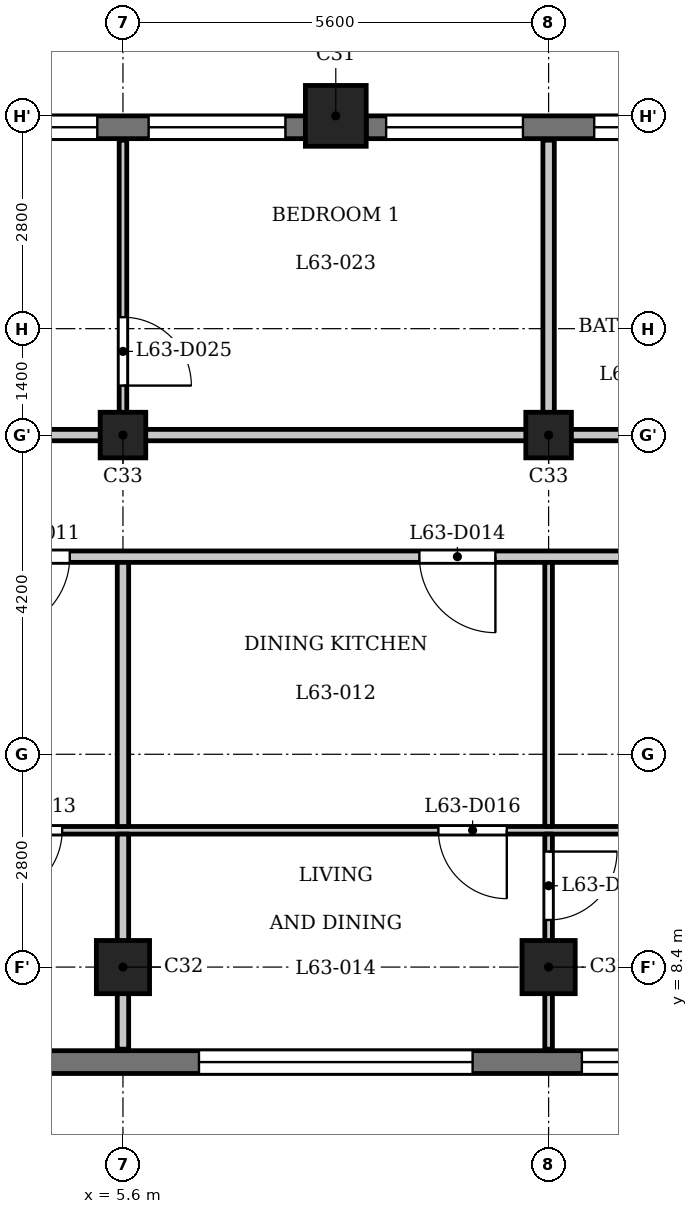
"""IFC4 building model, lengths in metres.
Left out: names, types, materials, properties, quantities, classifications, styles, units other than length and angle.
Written with IfcOpenShell. Run it as: python <this file> out.ifc"""

import sys

from ifc_helpers import new_model, si_unit, direction, frame, frame_2d, origin, origin_2d, place, context, subcontext, project, spatial, rectangle, extrude, element, fill, save


model = new_model("IFC4")
c1 = context("Model", 3, precision=1e-05, world=origin(), true_north=direction((0.0, 1.0)))
c2 = subcontext(c1, "Body", "Model", "MODEL_VIEW")
j1 = project(units=[si_unit("LENGTHUNIT", "METRE"), si_unit("PLANEANGLEUNIT", "RADIAN")], contexts=[c1])
p1 = place(None, origin())
s1 = spatial("IfcSite", under=j1, at=p1, CompositionType="ELEMENT")
p2 = place(p1, origin())
s2 = spatial("IfcBuilding", under=s1, at=p2, CompositionType="ELEMENT")
p3 = place(p2, frame((0.0, 0.0, 245.2)))
s3 = spatial("IfcBuildingStorey", under=s2, at=p3, CompositionType="ELEMENT", Elevation=245.2)
p4 = place(p3, frame((8.4, 19.6, 0.0), z_axis=(0.0, 0.0, 1.0), x_axis=(1.0, 0.0, 0.0)))
e1 = element("IfcColumn", 1, at=p4, inside=s3, PredefinedType="COLUMN", context=c2, shape_type="SweptSolid", body=[
    extrude(rectangle(XDim=0.8, YDim=0.8, at=origin_2d()), origin(), (0.0, 0.0, 1.0), 3.5),
])
for number, where, z_axis, x_axis in (
    (2, (5.6, 8.4, 0.0), (0.0, 0.0, 1.0), (1.0, 0.0, 0.0)),
    (3, (11.2, 8.4, 0.0), (0.0, 0.0, 1.0), (1.0, 0.0, 0.0)),
):
    element("IfcColumn", number, at=place(p3, frame(where, z_axis=z_axis, x_axis=x_axis)), inside=s3, PredefinedType="COLUMN", context=c2, shape_type="SweptSolid", body=[
        extrude(rectangle(XDim=0.7, YDim=0.7, at=origin_2d()), origin(), (0.0, 0.0, 1.0), 3.5),
    ])
for number, where, z_axis, x_axis in (
    (4, (5.6, 15.4, 0.0), (0.0, 0.0, 1.0), (1.0, 0.0, 0.0)),
    (5, (11.2, 15.4, 0.0), (0.0, 0.0, 1.0), (1.0, 0.0, 0.0)),
):
    element("IfcColumn", number, at=place(p3, frame(where, z_axis=z_axis, x_axis=x_axis)), inside=s3, PredefinedType="COLUMN", context=c2, shape_type="SweptSolid", body=[
        extrude(rectangle(XDim=0.6, YDim=0.6, at=origin_2d()), origin(), (0.0, 0.0, 1.0), 3.5),
    ])
p5 = place(p3, frame((13.6, 19.45, 0.0), z_axis=(0.0, 0.0, 1.0), x_axis=(-1.0, 0.0, 0.0)))
e6 = element("IfcWall", 6, at=p5, inside=s3, PredefinedType="SOLIDWALL", context=c2, shape_type="SweptSolid", body=[
    extrude(rectangle(XDim=4.8, YDim=0.3, at=frame_2d((2.4, 0.0))), origin(), (0.0, 0.0, 1.0), 2.55),
])
p6 = place(p5, frame((0.6, 0.0, 0.6)))
e7 = element("IfcOpeningElement", 7, at=p6, cuts=e6, PredefinedType="OPENING", context=c2, shape_type="SweptSolid", body=[
    extrude(rectangle(XDim=1.2, YDim=1.55, at=frame_2d((0.6, 0.775))), frame((0.0, 0.16, 0.0), z_axis=(0.0, -1.0, 0.0), x_axis=(1.0, 0.0, 0.0)), (0.0, 0.0, 1.0), 0.32),
])
p7 = place(p5, frame((2.738, 0.0, 0.9)))
e8 = element("IfcOpeningElement", 8, at=p7, cuts=e6, PredefinedType="OPENING", context=c2, shape_type="SweptSolid", body=[
    extrude(rectangle(XDim=1.8, YDim=1.25, at=frame_2d((0.9, 0.625))), frame((0.0, 0.16, 0.0), z_axis=(0.0, -1.0, 0.0), x_axis=(1.0, 0.0, 0.0)), (0.0, 0.0, 1.0), 0.32),
])
p8 = place(p3, frame((8.0, 19.45, 0.0), z_axis=(0.0, 0.0, 1.0), x_axis=(-1.0, 0.0, 0.0)))
e9 = element("IfcWall", 9, at=p8, inside=s3, PredefinedType="SOLIDWALL", context=c2, shape_type="SweptSolid", body=[
    extrude(rectangle(XDim=4.8, YDim=0.3, at=frame_2d((2.4, 0.0))), origin(), (0.0, 0.0, 1.0), 2.55),
])
p9 = place(p8, frame((0.262, 0.0, 0.9)))
e10 = element("IfcOpeningElement", 10, at=p9, cuts=e9, PredefinedType="OPENING", context=c2, shape_type="SweptSolid", body=[
    extrude(rectangle(XDim=1.8, YDim=1.25, at=frame_2d((0.9, 0.625))), frame((0.0, 0.16, 0.0), z_axis=(0.0, -1.0, 0.0), x_axis=(1.0, 0.0, 0.0)), (0.0, 0.0, 1.0), 0.32),
])
p10 = place(p8, frame((2.738, 0.0, 0.9)))
e11 = element("IfcOpeningElement", 11, at=p10, cuts=e9, PredefinedType="OPENING", context=c2, shape_type="SweptSolid", body=[
    extrude(rectangle(XDim=1.8, YDim=1.25, at=frame_2d((0.9, 0.625))), frame((0.0, 0.16, 0.0), z_axis=(0.0, -1.0, 0.0), x_axis=(1.0, 0.0, 0.0)), (0.0, 0.0, 1.0), 0.32),
])
p11 = place(p3, frame((-13.8, 7.15, 0.0), z_axis=(0.0, 0.0, 1.0), x_axis=(1.0, 0.0, 0.0)))
e12 = element("IfcWall", 12, at=p11, inside=s3, PredefinedType="SOLIDWALL", context=c2, shape_type="SweptSolid", body=[
    extrude(rectangle(XDim=27.6, YDim=0.3, at=frame_2d((13.8, 0.0))), origin(), (0.0, 0.0, 1.0), 3.2),
])
p12 = place(p11, frame((0.363, 0.0, 0.9)))
e13 = element("IfcOpeningElement", 13, at=p12, cuts=e12, PredefinedType="OPENING", context=c2, shape_type="SweptSolid", body=[
    extrude(rectangle(XDim=1.8, YDim=1.25, at=frame_2d((0.9, 0.625))), frame((0.0, 0.16, 0.0), z_axis=(0.0, -1.0, 0.0), x_axis=(1.0, 0.0, 0.0)), (0.0, 0.0, 1.0), 0.32),
])
p13 = place(p11, frame((3.6, 0.0, 1.2)))
e14 = element("IfcOpeningElement", 14, at=p13, cuts=e12, PredefinedType="OPENING", context=c2, shape_type="SweptSolid", body=[
    extrude(rectangle(XDim=3.6, YDim=0.95, at=frame_2d((1.8, 0.475))), frame((0.0, 0.16, 0.0), z_axis=(0.0, -1.0, 0.0), x_axis=(1.0, 0.0, 0.0)), (0.0, 0.0, 1.0), 0.32),
])
p14 = place(p11, frame((9.2, 0.0, 1.2)))
e15 = element("IfcOpeningElement", 15, at=p14, cuts=e12, PredefinedType="OPENING", context=c2, shape_type="SweptSolid", body=[
    extrude(rectangle(XDim=3.6, YDim=0.95, at=frame_2d((1.8, 0.475))), frame((0.0, 0.16, 0.0), z_axis=(0.0, -1.0, 0.0), x_axis=(1.0, 0.0, 0.0)), (0.0, 0.0, 1.0), 0.32),
])
p15 = place(p11, frame((14.8, 0.0, 1.2)))
e16 = element("IfcOpeningElement", 16, at=p15, cuts=e12, PredefinedType="OPENING", context=c2, shape_type="SweptSolid", body=[
    extrude(rectangle(XDim=3.6, YDim=0.95, at=frame_2d((1.8, 0.475))), frame((0.0, 0.16, 0.0), z_axis=(0.0, -1.0, 0.0), x_axis=(1.0, 0.0, 0.0)), (0.0, 0.0, 1.0), 0.32),
])
p16 = place(p11, frame((20.4, 0.0, 1.2)))
e17 = element("IfcOpeningElement", 17, at=p16, cuts=e12, PredefinedType="OPENING", context=c2, shape_type="SweptSolid", body=[
    extrude(rectangle(XDim=3.6, YDim=0.95, at=frame_2d((1.8, 0.475))), frame((0.0, 0.16, 0.0), z_axis=(0.0, -1.0, 0.0), x_axis=(1.0, 0.0, 0.0)), (0.0, 0.0, 1.0), 0.32),
])
p17 = place(p11, frame((25.438, 0.0, 0.9)))
e18 = element("IfcOpeningElement", 18, at=p17, cuts=e12, PredefinedType="OPENING", context=c2, shape_type="SweptSolid", body=[
    extrude(rectangle(XDim=1.8, YDim=1.25, at=frame_2d((0.9, 0.625))), frame((0.0, 0.16, 0.0), z_axis=(0.0, -1.0, 0.0), x_axis=(1.0, 0.0, 0.0)), (0.0, 0.0, 1.0), 0.32),
])
p18 = place(p3, frame((-14.925, 10.2, 0.0), z_axis=(0.0, 0.0, 1.0), x_axis=(1.0, 0.0, 0.0)))
e19 = element("IfcWall", 19, at=p18, inside=s3, PredefinedType="PARTITIONING", context=c2, shape_type="SweptSolid", body=[
    extrude(rectangle(XDim=29.85, YDim=0.1, at=frame_2d((14.925, 0.0))), origin(), (0.0, 0.0, 1.0), 3.2),
])
p19 = place(p18, frame((13.475, 0.0, 0.0)))
e20 = element("IfcOpeningElement", 20, at=p19, cuts=e19, PredefinedType="OPENING", context=c2, shape_type="SweptSolid", body=[
    extrude(rectangle(XDim=0.9, YDim=2.1, at=frame_2d((0.45, 1.05))), frame((0.0, 0.06, 0.0), z_axis=(0.0, -1.0, 0.0), x_axis=(1.0, 0.0, 0.0)), (0.0, 0.0, 1.0), 0.12),
])
p20 = place(p18, frame((4.375, 0.0, 0.0)))
e21 = element("IfcOpeningElement", 21, at=p20, cuts=e19, PredefinedType="OPENING", context=c2, shape_type="SweptSolid", body=[
    extrude(rectangle(XDim=0.9, YDim=2.1, at=frame_2d((0.45, 1.05))), frame((0.0, 0.06, 0.0), z_axis=(0.0, -1.0, 0.0), x_axis=(1.0, 0.0, 0.0)), (0.0, 0.0, 1.0), 0.12),
])
p21 = place(p18, frame((15.475, 0.0, 0.0)))
e22 = element("IfcOpeningElement", 22, at=p21, cuts=e19, PredefinedType="OPENING", context=c2, shape_type="SweptSolid", body=[
    extrude(rectangle(XDim=0.8, YDim=2.1, at=frame_2d((0.4, 1.05))), frame((0.0, 0.06, 0.0), z_axis=(0.0, -1.0, 0.0), x_axis=(1.0, 0.0, 0.0)), (0.0, 0.0, 1.0), 0.12),
])
p22 = place(p18, frame((18.825, 0.0, 0.0)))
e23 = element("IfcOpeningElement", 23, at=p22, cuts=e19, PredefinedType="OPENING", context=c2, shape_type="SweptSolid", body=[
    extrude(rectangle(XDim=0.9, YDim=2.1, at=frame_2d((0.45, 1.05))), frame((0.0, 0.06, 0.0), z_axis=(0.0, -1.0, 0.0), x_axis=(1.0, 0.0, 0.0)), (0.0, 0.0, 1.0), 0.12),
])
p23 = place(p18, frame((28.474, 0.0, 0.0)))
e24 = element("IfcOpeningElement", 24, at=p23, cuts=e19, PredefinedType="OPENING", context=c2, shape_type="SweptSolid", body=[
    extrude(rectangle(XDim=0.8, YDim=2.1, at=frame_2d((0.4, 1.05))), frame((0.0, 0.06, 0.0), z_axis=(0.0, -1.0, 0.0), x_axis=(1.0, 0.0, 0.0)), (0.0, 0.0, 1.0), 0.12),
])
p24 = place(p18, frame((24.675, 0.0, 0.0)))
e25 = element("IfcOpeningElement", 25, at=p24, cuts=e19, PredefinedType="OPENING", context=c2, shape_type="SweptSolid", body=[
    extrude(rectangle(XDim=0.9, YDim=2.1, at=frame_2d((0.45, 1.05))), frame((0.0, 0.06, 0.0), z_axis=(0.0, -1.0, 0.0), x_axis=(1.0, 0.0, 0.0)), (0.0, 0.0, 1.0), 0.12),
])
p25 = place(p3, frame((-15.075, 13.8, 0.0), z_axis=(0.0, 0.0, 1.0), x_axis=(1.0, 0.0, 0.0)))
e26 = element("IfcWall", 26, at=p25, inside=s3, PredefinedType="PARTITIONING", context=c2, shape_type="SweptSolid", body=[
    extrude(rectangle(XDim=30.15, YDim=0.15, at=frame_2d((15.075, 0.0))), origin(), (0.0, 0.0, 1.0), 3.2),
])
p26 = place(p25, frame((10.125, 0.0, 0.0)))
e27 = element("IfcOpeningElement", 27, at=p26, cuts=e26, PredefinedType="OPENING", context=c2, shape_type="SweptSolid", body=[
    extrude(rectangle(XDim=1.0, YDim=2.1, at=frame_2d((0.5, 1.05))), frame((0.0, 0.085, 0.0), z_axis=(0.0, -1.0, 0.0), x_axis=(1.0, 0.0, 0.0)), (0.0, 0.0, 1.0), 0.17),
])
p27 = place(p25, frame((18.975, 0.0, 0.0)))
e28 = element("IfcOpeningElement", 28, at=p27, cuts=e26, PredefinedType="OPENING", context=c2, shape_type="SweptSolid", body=[
    extrude(rectangle(XDim=1.0, YDim=2.1, at=frame_2d((0.5, 1.05))), frame((0.0, 0.085, 0.0), z_axis=(0.0, -1.0, 0.0), x_axis=(1.0, 0.0, 0.0)), (0.0, 0.0, 1.0), 0.17),
])
p28 = place(p25, frame((24.575, 0.0, 0.0)))
e29 = element("IfcOpeningElement", 29, at=p28, cuts=e26, PredefinedType="OPENING", context=c2, shape_type="SweptSolid", body=[
    extrude(rectangle(XDim=1.0, YDim=2.1, at=frame_2d((0.5, 1.05))), frame((0.0, 0.085, 0.0), z_axis=(0.0, -1.0, 0.0), x_axis=(1.0, 0.0, 0.0)), (0.0, 0.0, 1.0), 0.17),
])
p29 = place(p3, frame((-23.55, 15.4, 0.0), z_axis=(0.0, 0.0, 1.0), x_axis=(1.0, 0.0, 0.0)))
e30 = element("IfcWall", 30, at=p29, inside=s3, PredefinedType="PARTITIONING", context=c2, shape_type="SweptSolid", body=[
    extrude(rectangle(XDim=46.872, YDim=0.15, at=frame_2d((23.436, 0.0))), origin(), (0.0, 0.0, 1.0), 3.2),
])
p30 = place(p29, frame((12.9, 0.0, 0.0)))
e31 = element("IfcOpeningElement", 31, at=p30, cuts=e30, PredefinedType="OPENING", context=c2, shape_type="SweptSolid", body=[
    extrude(rectangle(XDim=1.0, YDim=2.1, at=frame_2d((0.5, 1.05))), frame((0.0, 0.085, 0.0), z_axis=(0.0, -1.0, 0.0), x_axis=(1.0, 0.0, 0.0)), (0.0, 0.0, 1.0), 0.17),
])
p31 = place(p29, frame((20.9, 0.0, 0.0)))
e32 = element("IfcOpeningElement", 32, at=p31, cuts=e30, PredefinedType="OPENING", context=c2, shape_type="SweptSolid", body=[
    extrude(rectangle(XDim=1.0, YDim=2.1, at=frame_2d((0.5, 1.05))), frame((0.0, 0.085, 0.0), z_axis=(0.0, -1.0, 0.0), x_axis=(1.0, 0.0, 0.0)), (0.0, 0.0, 1.0), 0.17),
])
p32 = place(p29, frame((37.7, 0.0, 0.0)))
e33 = element("IfcOpeningElement", 33, at=p32, cuts=e30, PredefinedType="OPENING", context=c2, shape_type="SweptSolid", body=[
    extrude(rectangle(XDim=1.0, YDim=2.1, at=frame_2d((0.5, 1.05))), frame((0.0, 0.085, 0.0), z_axis=(0.0, -1.0, 0.0), x_axis=(1.0, 0.0, 0.0)), (0.0, 0.0, 1.0), 0.17),
])
p33 = place(p3, frame((5.6, 15.475, 0.0), z_axis=(0.0, 0.0, 1.0), x_axis=(0.0, 1.0, 0.0)))
e34 = element("IfcWall", 34, at=p33, inside=s3, PredefinedType="PARTITIONING", context=c2, shape_type="SweptSolid", body=[
    extrude(rectangle(XDim=3.805, YDim=0.1, at=frame_2d((1.902, 0.0))), origin(), (0.0, 0.0, 1.0), 3.2),
])
p34 = place(p33, frame((0.576, 0.0, 0.0)))
e35 = element("IfcOpeningElement", 35, at=p34, cuts=e34, PredefinedType="OPENING", context=c2, shape_type="SweptSolid", body=[
    extrude(rectangle(XDim=0.9, YDim=2.1, at=frame_2d((0.45, 1.05))), frame((0.0, 0.06, 0.0), z_axis=(0.0, -1.0, 0.0), x_axis=(1.0, 0.0, 0.0)), (0.0, 0.0, 1.0), 0.12),
])
p35 = place(p3, frame((5.6, 7.32, 0.0), z_axis=(0.0, 0.0, 1.0), x_axis=(0.0, 1.0, 0.0)))
e36 = element("IfcWall", 36, at=p35, inside=s3, PredefinedType="PARTITIONING", context=c2, shape_type="SweptSolid", body=[
    extrude(rectangle(XDim=2.83, YDim=0.15, at=frame_2d((1.415, 0.0))), origin(), (0.0, 0.0, 1.0), 3.2),
])
p36 = place(p3, frame((5.6, 10.25, 0.0), z_axis=(0.0, 0.0, 1.0), x_axis=(0.0, 1.0, 0.0)))
e37 = element("IfcWall", 37, at=p36, inside=s3, PredefinedType="PARTITIONING", context=c2, shape_type="SweptSolid", body=[
    extrude(rectangle(XDim=3.475, YDim=0.15, at=frame_2d((1.738, 0.0))), origin(), (0.0, 0.0, 1.0), 3.2),
])
p37 = place(p3, frame((11.2, 7.32, 0.0), z_axis=(0.0, 0.0, 1.0), x_axis=(0.0, 1.0, 0.0)))
e38 = element("IfcWall", 38, at=p37, inside=s3, PredefinedType="PARTITIONING", context=c2, shape_type="SweptSolid", body=[
    extrude(rectangle(XDim=2.83, YDim=0.1, at=frame_2d((1.415, 0.0))), origin(), (0.0, 0.0, 1.0), 3.2),
])
p38 = place(p37, frame((1.7, 0.0, 0.0)))
e39 = element("IfcOpeningElement", 39, at=p38, cuts=e38, PredefinedType="OPENING", context=c2, shape_type="SweptSolid", body=[
    extrude(rectangle(XDim=0.9, YDim=2.1, at=frame_2d((0.45, 1.05))), frame((0.0, 0.06, 0.0), z_axis=(0.0, -1.0, 0.0), x_axis=(1.0, 0.0, 0.0)), (0.0, 0.0, 1.0), 0.12),
])
p39 = place(p3, frame((11.2, 10.25, 0.0), z_axis=(0.0, 0.0, 1.0), x_axis=(0.0, 1.0, 0.0)))
e40 = element("IfcWall", 40, at=p39, inside=s3, PredefinedType="PARTITIONING", context=c2, shape_type="SweptSolid", body=[
    extrude(rectangle(XDim=3.475, YDim=0.1, at=frame_2d((1.738, 0.0))), origin(), (0.0, 0.0, 1.0), 3.2),
])
p40 = place(p3, frame((11.2, 15.475, 0.0), z_axis=(0.0, 0.0, 1.0), x_axis=(0.0, 1.0, 0.0)))
e41 = element("IfcWall", 41, at=p40, inside=s3, PredefinedType="PARTITIONING", context=c2, shape_type="SweptSolid", body=[
    extrude(rectangle(XDim=3.805, YDim=0.15, at=frame_2d((1.902, 0.0))), origin(), (0.0, 0.0, 1.0), 3.2),
])
p41 = place(p27, origin())
e42 = element("IfcDoor", 42, at=p41, inside=s3, OperationType="SINGLE_SWING_LEFT", PredefinedType="DOOR", context=c2, shape_type="SweptSolid", body=[
    extrude(rectangle(XDim=1.0, YDim=2.1, at=frame_2d((0.5, 1.05))), frame((0.0, 0.025, 0.0), z_axis=(0.0, -1.0, 0.0), x_axis=(1.0, 0.0, 0.0)), (0.0, 0.0, 1.0), 0.05),
])
fill(e28, e42)
p42 = place(p22, origin())
e43 = element("IfcDoor", 43, at=p42, inside=s3, OperationType="SINGLE_SWING_LEFT", PredefinedType="DOOR", context=c2, shape_type="SweptSolid", body=[
    extrude(rectangle(XDim=0.9, YDim=2.1, at=frame_2d((0.45, 1.05))), frame((0.0, 0.025, 0.0), z_axis=(0.0, -1.0, 0.0), x_axis=(1.0, 0.0, 0.0)), (0.0, 0.0, 1.0), 0.05),
])
fill(e23, e43)
p43 = place(p28, origin())
e44 = element("IfcDoor", 44, at=p43, inside=s3, OperationType="SINGLE_SWING_RIGHT", PredefinedType="DOOR", context=c2, shape_type="SweptSolid", body=[
    extrude(rectangle(XDim=1.0, YDim=2.1, at=frame_2d((0.5, 1.05))), frame((0.0, 0.025, 0.0), z_axis=(0.0, -1.0, 0.0), x_axis=(1.0, 0.0, 0.0)), (0.0, 0.0, 1.0), 0.05),
])
fill(e29, e44)
p44 = place(p24, origin())
e45 = element("IfcDoor", 45, at=p44, inside=s3, OperationType="SINGLE_SWING_RIGHT", PredefinedType="DOOR", context=c2, shape_type="SweptSolid", body=[
    extrude(rectangle(XDim=0.9, YDim=2.1, at=frame_2d((0.45, 1.05))), frame((0.0, 0.025, 0.0), z_axis=(0.0, -1.0, 0.0), x_axis=(1.0, 0.0, 0.0)), (0.0, 0.0, 1.0), 0.05),
])
fill(e25, e45)
p45 = place(p38, origin())
e46 = element("IfcDoor", 46, at=p45, inside=s3, OperationType="SINGLE_SWING_RIGHT", PredefinedType="DOOR", context=c2, shape_type="SweptSolid", body=[
    extrude(rectangle(XDim=0.9, YDim=2.1, at=frame_2d((0.45, 1.05))), frame((0.0, 0.025, 0.0), z_axis=(0.0, -1.0, 0.0), x_axis=(1.0, 0.0, 0.0)), (0.0, 0.0, 1.0), 0.05),
])
fill(e39, e46)
p46 = place(p34, origin())
e47 = element("IfcDoor", 47, at=p46, inside=s3, OperationType="SINGLE_SWING_LEFT", PredefinedType="DOOR", context=c2, shape_type="SweptSolid", body=[
    extrude(rectangle(XDim=0.9, YDim=2.1, at=frame_2d((0.45, 1.05))), frame((0.0, 0.025, 0.0), z_axis=(0.0, -1.0, 0.0), x_axis=(1.0, 0.0, 0.0)), (0.0, 0.0, 1.0), 0.05),
])
fill(e35, e47)
p47 = place(p6, origin())
e48 = element("IfcWindow", 48, at=p47, inside=s3, PartitioningType="SINGLE_PANEL", PredefinedType="WINDOW", context=c2, shape_type="SweptSolid", body=[
    extrude(rectangle(XDim=1.2, YDim=1.55, at=frame_2d((0.6, 0.775))), frame((0.0, 0.03, 0.0), z_axis=(0.0, -1.0, 0.0), x_axis=(1.0, 0.0, 0.0)), (0.0, 0.0, 1.0), 0.06),
])
fill(e7, e48)
p48 = place(p7, origin())
e49 = element("IfcWindow", 49, at=p48, inside=s3, PartitioningType="SINGLE_PANEL", PredefinedType="WINDOW", context=c2, shape_type="SweptSolid", body=[
    extrude(rectangle(XDim=1.8, YDim=1.25, at=frame_2d((0.9, 0.625))), frame((0.0, 0.03, 0.0), z_axis=(0.0, -1.0, 0.0), x_axis=(1.0, 0.0, 0.0)), (0.0, 0.0, 1.0), 0.06),
])
fill(e8, e49)
p49 = place(p9, origin())
e50 = element("IfcWindow", 50, at=p49, inside=s3, PartitioningType="SINGLE_PANEL", PredefinedType="WINDOW", context=c2, shape_type="SweptSolid", body=[
    extrude(rectangle(XDim=1.8, YDim=1.25, at=frame_2d((0.9, 0.625))), frame((0.0, 0.03, 0.0), z_axis=(0.0, -1.0, 0.0), x_axis=(1.0, 0.0, 0.0)), (0.0, 0.0, 1.0), 0.06),
])
fill(e10, e50)
p50 = place(p10, origin())
e51 = element("IfcWindow", 51, at=p50, inside=s3, PartitioningType="SINGLE_PANEL", PredefinedType="WINDOW", context=c2, shape_type="SweptSolid", body=[
    extrude(rectangle(XDim=1.8, YDim=1.25, at=frame_2d((0.9, 0.625))), frame((0.0, 0.03, 0.0), z_axis=(0.0, -1.0, 0.0), x_axis=(1.0, 0.0, 0.0)), (0.0, 0.0, 1.0), 0.06),
])
fill(e11, e51)
p51 = place(p16, origin())
e52 = element("IfcWindow", 52, at=p51, inside=s3, PartitioningType="SINGLE_PANEL", PredefinedType="WINDOW", context=c2, shape_type="SweptSolid", body=[
    extrude(rectangle(XDim=3.6, YDim=0.95, at=frame_2d((1.8, 0.475))), frame((0.0, 0.03, 0.0), z_axis=(0.0, -1.0, 0.0), x_axis=(1.0, 0.0, 0.0)), (0.0, 0.0, 1.0), 0.06),
])
fill(e17, e52)
p52 = place(p17, origin())
e53 = element("IfcWindow", 53, at=p52, inside=s3, PartitioningType="SINGLE_PANEL", PredefinedType="WINDOW", context=c2, shape_type="SweptSolid", body=[
    extrude(rectangle(XDim=1.8, YDim=1.25, at=frame_2d((0.9, 0.625))), frame((0.0, 0.03, 0.0), z_axis=(0.0, -1.0, 0.0), x_axis=(1.0, 0.0, 0.0)), (0.0, 0.0, 1.0), 0.06),
])
fill(e18, e53)
save(model, sys.argv[1])
